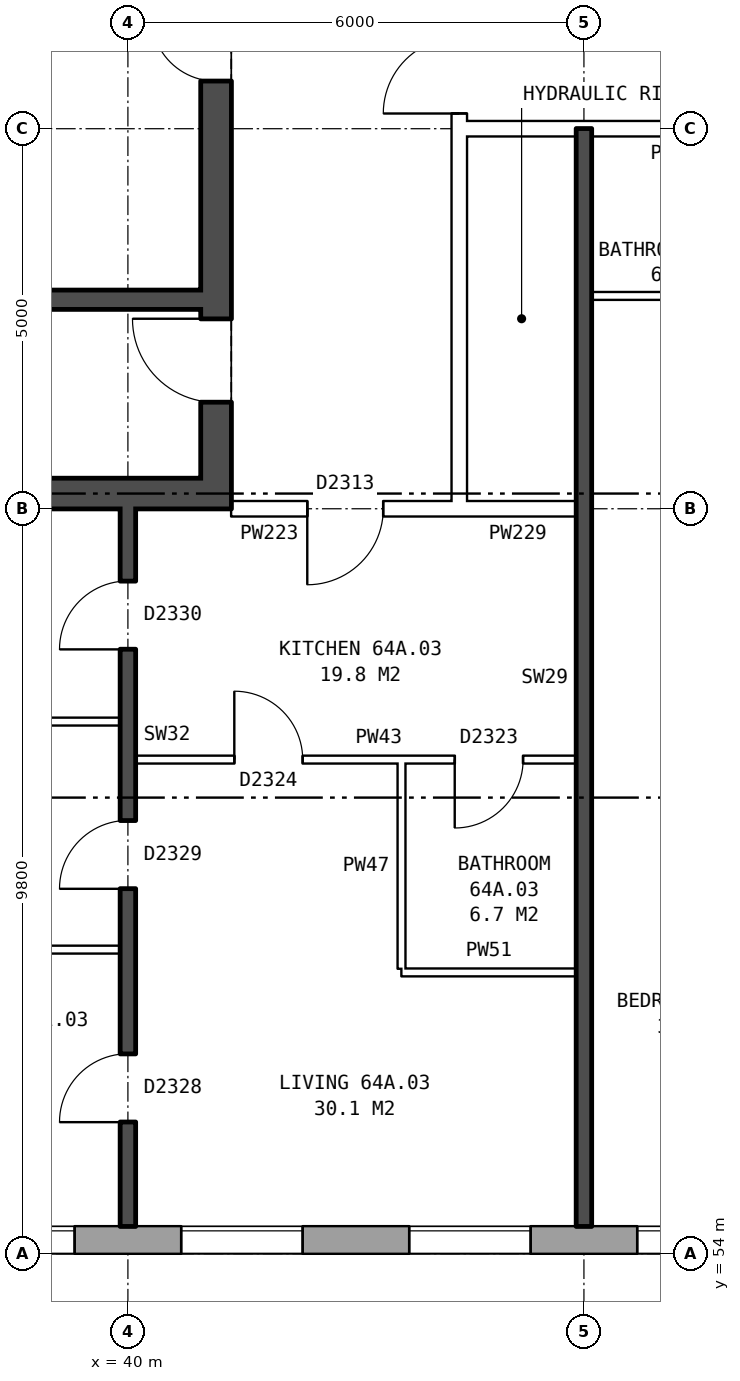
"""IFC4 building model, lengths in metres.
Left out: names, types, materials, properties, quantities, classifications, styles, units other than length and angle.
Written with IfcOpenShell. Run it as: python <this file> out.ifc"""

import sys

from ifc_helpers import new_model, si_unit, direction, frame, frame_2d, origin, place, context, subcontext, project, spatial, rectangle, extrude, element, fill, save


model = new_model("IFC4")
c1 = context("Model", 3, precision=1e-05, world=origin(), true_north=direction((0.0, 1.0)))
c2 = subcontext(c1, "Body", "Model", "MODEL_VIEW")
j1 = project(units=[si_unit("LENGTHUNIT", "METRE"), si_unit("PLANEANGLEUNIT", "RADIAN")], contexts=[c1])
p1 = place(None, origin())
s1 = spatial("IfcSite", under=j1, at=p1, CompositionType="ELEMENT")
p2 = place(p1, origin())
s2 = spatial("IfcBuilding", under=s1, at=p2, CompositionType="ELEMENT")
p3 = place(p2, frame((0.0, 0.0, 227.6)))
s3 = spatial("IfcBuildingStorey", under=s2, at=p3, CompositionType="ELEMENT", Elevation=227.6)
p4 = place(p3, frame((35.075, 54.18, 0.0), z_axis=(0.0, 0.0, 1.0), x_axis=(1.0, 0.0, 0.0)))
e1 = element("IfcWall", 1, at=p4, inside=s3, PredefinedType="STANDARD", context=c2, shape_type="SweptSolid", body=[
    extrude(rectangle(XDim=39.875, YDim=0.36, at=frame_2d((19.938, 0.0))), origin(), (0.0, 0.0, 1.0), 2.85),
])
p5 = place(p4, frame((2.625, 0.0, 0.8)))
e2 = element("IfcOpeningElement", 2, at=p5, cuts=e1, PredefinedType="OPENING", context=c2, shape_type="SweptSolid", body=[
    extrude(rectangle(XDim=1.6, YDim=1.8, at=frame_2d((0.8, 0.9))), frame((0.0, 0.19, 0.0), z_axis=(0.0, -1.0, 0.0), x_axis=(1.0, 0.0, 0.0)), (0.0, 0.0, 1.0), 0.38),
])
p6 = place(p4, frame((5.625, 0.0, 0.8)))
e3 = element("IfcOpeningElement", 3, at=p6, cuts=e1, PredefinedType="OPENING", context=c2, shape_type="SweptSolid", body=[
    extrude(rectangle(XDim=1.6, YDim=1.8, at=frame_2d((0.8, 0.9))), frame((0.0, 0.19, 0.0), z_axis=(0.0, -1.0, 0.0), x_axis=(1.0, 0.0, 0.0)), (0.0, 0.0, 1.0), 0.38),
])
p7 = place(p4, frame((8.625, 0.0, 0.8)))
e4 = element("IfcOpeningElement", 4, at=p7, cuts=e1, PredefinedType="OPENING", context=c2, shape_type="SweptSolid", body=[
    extrude(rectangle(XDim=1.6, YDim=1.8, at=frame_2d((0.8, 0.9))), frame((0.0, 0.19, 0.0), z_axis=(0.0, -1.0, 0.0), x_axis=(1.0, 0.0, 0.0)), (0.0, 0.0, 1.0), 0.38),
])
p8 = place(p4, frame((11.625, 0.0, 0.8)))
e5 = element("IfcOpeningElement", 5, at=p8, cuts=e1, PredefinedType="OPENING", context=c2, shape_type="SweptSolid", body=[
    extrude(rectangle(XDim=1.6, YDim=1.8, at=frame_2d((0.8, 0.9))), frame((0.0, 0.19, 0.0), z_axis=(0.0, -1.0, 0.0), x_axis=(1.0, 0.0, 0.0)), (0.0, 0.0, 1.0), 0.38),
])
p9 = place(p4, frame((14.625, 0.0, 0.35)))
e6 = element("IfcOpeningElement", 6, at=p9, cuts=e1, PredefinedType="OPENING", context=c2, shape_type="SweptSolid", body=[
    extrude(rectangle(XDim=0.6, YDim=0.9, at=frame_2d((0.3, 0.45))), frame((0.0, 0.19, 0.0), z_axis=(0.0, -1.0, 0.0), x_axis=(1.0, 0.0, 0.0)), (0.0, 0.0, 1.0), 0.38),
])
p10 = place(p4, frame((17.625, 0.0, 0.8)))
e7 = element("IfcOpeningElement", 7, at=p10, cuts=e1, PredefinedType="OPENING", context=c2, shape_type="SweptSolid", body=[
    extrude(rectangle(XDim=1.6, YDim=1.8, at=frame_2d((0.8, 0.9))), frame((0.0, 0.19, 0.0), z_axis=(0.0, -1.0, 0.0), x_axis=(1.0, 0.0, 0.0)), (0.0, 0.0, 1.0), 0.38),
])
p11 = place(p4, frame((20.625, 0.0, 0.8)))
e8 = element("IfcOpeningElement", 8, at=p11, cuts=e1, PredefinedType="OPENING", context=c2, shape_type="SweptSolid", body=[
    extrude(rectangle(XDim=1.6, YDim=1.8, at=frame_2d((0.8, 0.9))), frame((0.0, 0.19, 0.0), z_axis=(0.0, -1.0, 0.0), x_axis=(1.0, 0.0, 0.0)), (0.0, 0.0, 1.0), 0.38),
])
p12 = place(p4, frame((24.075, 0.0, 1.7)))
e9 = element("IfcOpeningElement", 9, at=p12, cuts=e1, PredefinedType="OPENING", context=c2, shape_type="SweptSolid", body=[
    extrude(rectangle(XDim=0.6, YDim=0.9, at=frame_2d((0.3, 0.45))), frame((0.0, 0.19, 0.0), z_axis=(0.0, -1.0, 0.0), x_axis=(1.0, 0.0, 0.0)), (0.0, 0.0, 1.0), 0.38),
])
p13 = place(p4, frame((26.625, 0.0, 0.8)))
e10 = element("IfcOpeningElement", 10, at=p13, cuts=e1, PredefinedType="OPENING", context=c2, shape_type="SweptSolid", body=[
    extrude(rectangle(XDim=1.6, YDim=1.8, at=frame_2d((0.8, 0.9))), frame((0.0, 0.19, 0.0), z_axis=(0.0, -1.0, 0.0), x_axis=(1.0, 0.0, 0.0)), (0.0, 0.0, 1.0), 0.38),
])
p14 = place(p4, frame((29.625, 0.0, 0.8)))
e11 = element("IfcOpeningElement", 11, at=p14, cuts=e1, PredefinedType="OPENING", context=c2, shape_type="SweptSolid", body=[
    extrude(rectangle(XDim=1.6, YDim=1.8, at=frame_2d((0.8, 0.9))), frame((0.0, 0.19, 0.0), z_axis=(0.0, -1.0, 0.0), x_axis=(1.0, 0.0, 0.0)), (0.0, 0.0, 1.0), 0.38),
])
p15 = place(p4, frame((32.625, 0.0, 0.8)))
e12 = element("IfcOpeningElement", 12, at=p15, cuts=e1, PredefinedType="OPENING", context=c2, shape_type="SweptSolid", body=[
    extrude(rectangle(XDim=1.6, YDim=1.8, at=frame_2d((0.8, 0.9))), frame((0.0, 0.19, 0.0), z_axis=(0.0, -1.0, 0.0), x_axis=(1.0, 0.0, 0.0)), (0.0, 0.0, 1.0), 0.38),
])
p16 = place(p4, frame((35.625, 0.0, 0.8)))
e13 = element("IfcOpeningElement", 13, at=p16, cuts=e1, PredefinedType="OPENING", context=c2, shape_type="SweptSolid", body=[
    extrude(rectangle(XDim=1.6, YDim=1.8, at=frame_2d((0.8, 0.9))), frame((0.0, 0.19, 0.0), z_axis=(0.0, -1.0, 0.0), x_axis=(1.0, 0.0, 0.0)), (0.0, 0.0, 1.0), 0.38),
])
p17 = place(p4, frame((15.525, 0.0, 0.75)))
e14 = element("IfcOpeningElement", 14, at=p17, cuts=e1, PredefinedType="OPENING", context=c2, shape_type="SweptSolid", body=[
    extrude(rectangle(XDim=1.2, YDim=1.8, at=frame_2d((0.6, 0.9))), frame((0.0, 0.19, 0.0), z_axis=(0.0, -1.0, 0.0), x_axis=(1.0, 0.0, 0.0)), (0.0, 0.0, 1.0), 0.38),
])
p18 = place(p4, frame((24.975, 0.0, 0.8)))
e15 = element("IfcOpeningElement", 15, at=p18, cuts=e1, PredefinedType="OPENING", context=c2, shape_type="SweptSolid", body=[
    extrude(rectangle(XDim=0.8, YDim=1.8, at=frame_2d((0.4, 0.9))), frame((0.0, 0.19, 0.0), z_axis=(0.0, -1.0, 0.0), x_axis=(1.0, 0.0, 0.0)), (0.0, 0.0, 1.0), 0.38),
])
p19 = place(p3, frame((41.16, 76.2, 0.0), z_axis=(0.0, 0.0, 1.0), x_axis=(0.0, -1.0, 0.0)))
e16 = element("IfcWall", 16, at=p19, inside=s3, PredefinedType="SHEAR", context=c2, shape_type="SweptSolid", body=[
    extrude(rectangle(XDim=12.4, YDim=0.4, at=frame_2d((6.2, 0.0))), origin(), (0.0, 0.0, 1.0), 2.85),
])
p20 = place(p19, frame((1.325, 0.0, 0.0)))
e17 = element("IfcOpeningElement", 17, at=p20, cuts=e16, PredefinedType="OPENING", context=c2, shape_type="SweptSolid", body=[
    extrude(rectangle(XDim=1.1, YDim=2.1, at=frame_2d((0.55, 1.05))), frame((0.0, 0.21, 0.0), z_axis=(0.0, -1.0, 0.0), x_axis=(1.0, 0.0, 0.0)), (0.0, 0.0, 1.0), 0.42),
])
p21 = place(p19, frame((5.925, 0.0, 0.0)))
e18 = element("IfcOpeningElement", 18, at=p21, cuts=e16, PredefinedType="OPENING", context=c2, shape_type="SweptSolid", body=[
    extrude(rectangle(XDim=0.85, YDim=2.1, at=frame_2d((0.425, 1.05))), frame((0.0, 0.21, 0.0), z_axis=(0.0, -1.0, 0.0), x_axis=(1.0, 0.0, 0.0)), (0.0, 0.0, 1.0), 0.42),
])
p22 = place(p19, frame((9.9, 0.0, 0.0)))
e19 = element("IfcOpeningElement", 19, at=p22, cuts=e16, PredefinedType="OPENING", context=c2, shape_type="SweptSolid", body=[
    extrude(rectangle(XDim=1.1, YDim=2.1, at=frame_2d((0.55, 1.05))), frame((0.0, 0.21, 0.0), z_axis=(0.0, -1.0, 0.0), x_axis=(1.0, 0.0, 0.0)), (0.0, 0.0, 1.0), 0.42),
])
p23 = place(p3, frame((40.96, 64.0, 0.0), z_axis=(0.0, 0.0, 1.0), x_axis=(-1.0, 0.0, 0.0)))
e20 = element("IfcWall", 20, at=p23, inside=s3, PredefinedType="SHEAR", context=c2, shape_type="SweptSolid", body=[
    extrude(rectangle(XDim=8.2, YDim=0.4, at=frame_2d((4.1, 0.0))), origin(), (0.0, 0.0, 1.0), 2.85),
])
p24 = place(p3, frame((40.96, 66.55, 0.0), z_axis=(0.0, 0.0, 1.0), x_axis=(-1.0, 0.0, 0.0)))
e21 = element("IfcWall", 21, at=p24, inside=s3, PredefinedType="SHEAR", context=c2, shape_type="SweptSolid", body=[
    extrude(rectangle(XDim=2.525, YDim=0.25, at=frame_2d((1.262, 0.0))), origin(), (0.0, 0.0, 1.0), 2.85),
])
p25 = place(p3, frame((44.36, 63.9, 0.0), z_axis=(0.0, 0.0, 1.0), x_axis=(0.0, 1.0, 0.0)))
e22 = element("IfcWall", 22, at=p25, inside=s3, PredefinedType="PARTITIONING", context=c2, shape_type="SweptSolid", body=[
    extrude(rectangle(XDim=12.2, YDim=0.2, at=frame_2d((6.1, 0.0))), origin(), (0.0, 0.0, 1.0), 2.85),
])
p26 = place(p25, frame((5.1, 0.0, 0.0)))
e23 = element("IfcOpeningElement", 23, at=p26, cuts=e22, PredefinedType="OPENING", context=c2, shape_type="SweptSolid", body=[
    extrude(rectangle(XDim=2.0, YDim=2.1, at=frame_2d((1.0, 1.05))), frame((0.0, 0.11, 0.0), z_axis=(0.0, -1.0, 0.0), x_axis=(1.0, 0.0, 0.0)), (0.0, 0.0, 1.0), 0.22),
])
p27 = place(p3, frame((43.6, 57.7, 0.0), z_axis=(0.0, 0.0, 1.0), x_axis=(1.0, 0.0, 0.0)))
e24 = element("IfcWall", 24, at=p27, inside=s3, PredefinedType="PARTITIONING", context=c2, shape_type="SweptSolid", body=[
    extrude(rectangle(XDim=2.3, YDim=0.1, at=frame_2d((1.15, 0.0))), origin(), (0.0, 0.0, 1.0), 2.85),
])
p28 = place(p3, frame((32.36, 58.0, 0.0), z_axis=(0.0, 0.0, 1.0), x_axis=(1.0, 0.0, 0.0)))
e25 = element("IfcWall", 25, at=p28, inside=s3, PredefinedType="PARTITIONING", context=c2, shape_type="SweptSolid", body=[
    extrude(rectangle(XDim=7.54, YDim=0.1, at=frame_2d((3.77, 0.0))), origin(), (0.0, 0.0, 1.0), 2.85),
])
p29 = place(p3, frame((40.1, 60.5, 0.0), z_axis=(0.0, 0.0, 1.0), x_axis=(1.0, 0.0, 0.0)))
e26 = element("IfcWall", 26, at=p29, inside=s3, PredefinedType="PARTITIONING", context=c2, shape_type="SweptSolid", body=[
    extrude(rectangle(XDim=5.8, YDim=0.1, at=frame_2d((2.9, 0.0))), origin(), (0.0, 0.0, 1.0), 2.85),
])
p30 = place(p29, frame((1.3, 0.0, 0.0)))
e27 = element("IfcOpeningElement", 27, at=p30, cuts=e26, PredefinedType="OPENING", context=c2, shape_type="SweptSolid", body=[
    extrude(rectangle(XDim=0.9, YDim=2.1, at=frame_2d((0.45, 1.05))), frame((0.0, 0.06, 0.0), z_axis=(0.0, -1.0, 0.0), x_axis=(1.0, 0.0, 0.0)), (0.0, 0.0, 1.0), 0.12),
])
p31 = place(p29, frame((4.2, 0.0, 0.0)))
e28 = element("IfcOpeningElement", 28, at=p31, cuts=e26, PredefinedType="OPENING", context=c2, shape_type="SweptSolid", body=[
    extrude(rectangle(XDim=0.9, YDim=2.1, at=frame_2d((0.45, 1.05))), frame((0.0, 0.06, 0.0), z_axis=(0.0, -1.0, 0.0), x_axis=(1.0, 0.0, 0.0)), (0.0, 0.0, 1.0), 0.12),
])
p32 = place(p3, frame((32.36, 61.0, 0.0), z_axis=(0.0, 0.0, 1.0), x_axis=(1.0, 0.0, 0.0)))
e29 = element("IfcWall", 29, at=p32, inside=s3, PredefinedType="PARTITIONING", context=c2, shape_type="SweptSolid", body=[
    extrude(rectangle(XDim=7.54, YDim=0.1, at=frame_2d((3.77, 0.0))), origin(), (0.0, 0.0, 1.0), 2.85),
])
p33 = place(p3, frame((41.36, 63.8, 0.0), z_axis=(0.0, 0.0, 1.0), x_axis=(1.0, 0.0, 0.0)))
e30 = element("IfcWall", 30, at=p33, inside=s3, PredefinedType="PARTITIONING", context=c2, shape_type="SweptSolid", body=[
    extrude(rectangle(XDim=3.0, YDim=0.2, at=frame_2d((1.5, 0.0))), origin(), (0.0, 0.0, 1.0), 2.85),
])
p34 = place(p33, frame((1.0, 0.0, 0.0)))
e31 = element("IfcOpeningElement", 31, at=p34, cuts=e30, PredefinedType="OPENING", context=c2, shape_type="SweptSolid", body=[
    extrude(rectangle(XDim=1.0, YDim=2.1, at=frame_2d((0.5, 1.05))), frame((0.0, 0.11, 0.0), z_axis=(0.0, -1.0, 0.0), x_axis=(1.0, 0.0, 0.0)), (0.0, 0.0, 1.0), 0.22),
])
p35 = place(p3, frame((44.36, 63.8, 0.0), z_axis=(0.0, 0.0, 1.0), x_axis=(1.0, 0.0, 0.0)))
e32 = element("IfcWall", 32, at=p35, inside=s3, PredefinedType="PARTITIONING", context=c2, shape_type="SweptSolid", body=[
    extrude(rectangle(XDim=1.54, YDim=0.2, at=frame_2d((0.77, 0.0))), origin(), (0.0, 0.0, 1.0), 2.85),
])
p36 = place(p3, frame((46.1, 66.6, 0.0), z_axis=(0.0, 0.0, 1.0), x_axis=(1.0, 0.0, 0.0)))
e33 = element("IfcWall", 33, at=p36, inside=s3, PredefinedType="PARTITIONING", context=c2, shape_type="SweptSolid", body=[
    extrude(rectangle(XDim=2.9, YDim=0.1, at=frame_2d((1.45, 0.0))), origin(), (0.0, 0.0, 1.0), 2.85),
])
p37 = place(p3, frame((44.36, 68.8, 0.0), z_axis=(0.0, 0.0, 1.0), x_axis=(1.0, 0.0, 0.0)))
e34 = element("IfcWall", 34, at=p37, inside=s3, PredefinedType="PARTITIONING", context=c2, shape_type="SweptSolid", body=[
    extrude(rectangle(XDim=19.28, YDim=0.2, at=frame_2d((9.64, 0.0))), origin(), (0.0, 0.0, 1.0), 2.85),
])
p38 = place(p37, frame((14.64, 0.0, 0.0)))
e35 = element("IfcOpeningElement", 35, at=p38, cuts=e34, PredefinedType="OPENING", context=c2, shape_type="SweptSolid", body=[
    extrude(rectangle(XDim=1.0, YDim=2.1, at=frame_2d((0.5, 1.05))), frame((0.0, 0.11, 0.0), z_axis=(0.0, -1.0, 0.0), x_axis=(1.0, 0.0, 0.0)), (0.0, 0.0, 1.0), 0.22),
])
p39 = place(p37, frame((8.64, 0.0, 0.0)))
e36 = element("IfcOpeningElement", 36, at=p39, cuts=e34, PredefinedType="OPENING", context=c2, shape_type="SweptSolid", body=[
    extrude(rectangle(XDim=1.0, YDim=2.1, at=frame_2d((0.5, 1.05))), frame((0.0, 0.11, 0.0), z_axis=(0.0, -1.0, 0.0), x_axis=(1.0, 0.0, 0.0)), (0.0, 0.0, 1.0), 0.22),
])
p40 = place(p37, frame((5.64, 0.0, 0.0)))
e37 = element("IfcOpeningElement", 37, at=p40, cuts=e34, PredefinedType="OPENING", context=c2, shape_type="SweptSolid", body=[
    extrude(rectangle(XDim=1.0, YDim=2.1, at=frame_2d((0.5, 1.05))), frame((0.0, 0.11, 0.0), z_axis=(0.0, -1.0, 0.0), x_axis=(1.0, 0.0, 0.0)), (0.0, 0.0, 1.0), 0.22),
])
p41 = place(p3, frame((40.0, 54.36, 0.0), z_axis=(0.0, 0.0, 1.0), x_axis=(0.0, 1.0, 0.0)))
e38 = element("IfcWall", 38, at=p41, inside=s3, PredefinedType="SOLIDWALL", context=c2, shape_type="SweptSolid", body=[
    extrude(rectangle(XDim=9.44, YDim=0.2, at=frame_2d((4.72, 0.0))), origin(), (0.0, 0.0, 1.0), 2.85),
])
p42 = place(p41, frame((1.37, 0.0, 0.0)))
e39 = element("IfcOpeningElement", 39, at=p42, cuts=e38, PredefinedType="OPENING", context=c2, shape_type="SweptSolid", body=[
    extrude(rectangle(XDim=0.9, YDim=2.1, at=frame_2d((0.45, 1.05))), frame((0.0, 0.11, 0.0), z_axis=(0.0, -1.0, 0.0), x_axis=(1.0, 0.0, 0.0)), (0.0, 0.0, 1.0), 0.22),
])
p43 = place(p41, frame((4.44, 0.0, 0.0)))
e40 = element("IfcOpeningElement", 40, at=p43, cuts=e38, PredefinedType="OPENING", context=c2, shape_type="SweptSolid", body=[
    extrude(rectangle(XDim=0.9, YDim=2.1, at=frame_2d((0.45, 1.05))), frame((0.0, 0.11, 0.0), z_axis=(0.0, -1.0, 0.0), x_axis=(1.0, 0.0, 0.0)), (0.0, 0.0, 1.0), 0.22),
])
p44 = place(p41, frame((7.59, 0.0, 0.0)))
e41 = element("IfcOpeningElement", 41, at=p44, cuts=e38, PredefinedType="OPENING", context=c2, shape_type="SweptSolid", body=[
    extrude(rectangle(XDim=0.9, YDim=2.1, at=frame_2d((0.45, 1.05))), frame((0.0, 0.11, 0.0), z_axis=(0.0, -1.0, 0.0), x_axis=(1.0, 0.0, 0.0)), (0.0, 0.0, 1.0), 0.22),
])
p45 = place(p3, frame((43.6, 57.75, 0.0), z_axis=(0.0, 0.0, 1.0), x_axis=(0.0, 1.0, 0.0)))
e42 = element("IfcWall", 42, at=p45, inside=s3, PredefinedType="PARTITIONING", context=c2, shape_type="SweptSolid", body=[
    extrude(rectangle(XDim=2.7, YDim=0.1, at=frame_2d((1.35, 0.0))), origin(), (0.0, 0.0, 1.0), 2.85),
])
p46 = place(p3, frame((46.0, 54.36, 0.0), z_axis=(0.0, 0.0, 1.0), x_axis=(0.0, 1.0, 0.0)))
e43 = element("IfcWall", 43, at=p46, inside=s3, PredefinedType="SOLIDWALL", context=c2, shape_type="SweptSolid", body=[
    extrude(rectangle(XDim=14.44, YDim=0.2, at=frame_2d((7.22, 0.0))), origin(), (0.0, 0.0, 1.0), 2.85),
])
p47 = place(p5, origin())
e44 = element("IfcWindow", 44, at=p47, inside=s3, PartitioningType="SINGLE_PANEL", PredefinedType="WINDOW", context=c2, shape_type="SweptSolid", body=[
    extrude(rectangle(XDim=1.6, YDim=1.8, at=frame_2d((0.8, 0.9))), frame((0.0, 0.15, 0.0), z_axis=(0.0, -1.0, 0.0), x_axis=(1.0, 0.0, 0.0)), (0.0, 0.0, 1.0), 0.06),
])
fill(e2, e44)
p48 = place(p6, origin())
e45 = element("IfcWindow", 45, at=p48, inside=s3, PartitioningType="SINGLE_PANEL", PredefinedType="WINDOW", context=c2, shape_type="SweptSolid", body=[
    extrude(rectangle(XDim=1.6, YDim=1.8, at=frame_2d((0.8, 0.9))), frame((0.0, 0.15, 0.0), z_axis=(0.0, -1.0, 0.0), x_axis=(1.0, 0.0, 0.0)), (0.0, 0.0, 1.0), 0.06),
])
fill(e3, e45)
p49 = place(p7, origin())
e46 = element("IfcWindow", 46, at=p49, inside=s3, PartitioningType="SINGLE_PANEL", PredefinedType="WINDOW", context=c2, shape_type="SweptSolid", body=[
    extrude(rectangle(XDim=1.6, YDim=1.8, at=frame_2d((0.8, 0.9))), frame((0.0, 0.15, 0.0), z_axis=(0.0, -1.0, 0.0), x_axis=(1.0, 0.0, 0.0)), (0.0, 0.0, 1.0), 0.06),
])
fill(e4, e46)
p50 = place(p8, origin())
e47 = element("IfcWindow", 47, at=p50, inside=s3, PartitioningType="SINGLE_PANEL", PredefinedType="WINDOW", context=c2, shape_type="SweptSolid", body=[
    extrude(rectangle(XDim=1.6, YDim=1.8, at=frame_2d((0.8, 0.9))), frame((0.0, 0.15, 0.0), z_axis=(0.0, -1.0, 0.0), x_axis=(1.0, 0.0, 0.0)), (0.0, 0.0, 1.0), 0.06),
])
fill(e5, e47)
p51 = place(p21, frame((0.85, 0.0, 0.0), z_axis=(0.0, 0.0, 1.0), x_axis=(-1.0, 0.0, 0.0)))
e48 = element("IfcDoor", 48, at=p51, inside=s3, OperationType="SINGLE_SWING_RIGHT", PredefinedType="DOOR", context=c2, shape_type="SweptSolid", body=[
    extrude(rectangle(XDim=0.85, YDim=2.1, at=frame_2d((0.425, 1.05))), frame((0.0, 0.185, 0.0), z_axis=(0.0, -1.0, 0.0), x_axis=(1.0, 0.0, 0.0)), (0.0, 0.0, 1.0), 0.05),
])
fill(e18, e48)
p52 = place(p22, frame((1.1, 0.0, 0.0), z_axis=(0.0, 0.0, 1.0), x_axis=(-1.0, 0.0, 0.0)))
e49 = element("IfcDoor", 49, at=p52, inside=s3, OperationType="SINGLE_SWING_RIGHT", PredefinedType="DOOR", context=c2, shape_type="SweptSolid", body=[
    extrude(rectangle(XDim=1.1, YDim=2.1, at=frame_2d((0.55, 1.05))), frame((0.0, 0.185, 0.0), z_axis=(0.0, -1.0, 0.0), x_axis=(1.0, 0.0, 0.0)), (0.0, 0.0, 1.0), 0.05),
])
fill(e19, e49)
p53 = place(p26, origin())
e50 = element("IfcDoor", 50, at=p53, inside=s3, OperationType="DOUBLE_DOOR_SINGLE_SWING", PredefinedType="DOOR", context=c2, shape_type="SweptSolid", body=[
    extrude(rectangle(XDim=2.0, YDim=2.1, at=frame_2d((1.0, 1.05))), frame((0.0, 0.025, 0.0), z_axis=(0.0, -1.0, 0.0), x_axis=(1.0, 0.0, 0.0)), (0.0, 0.0, 1.0), 0.05),
])
fill(e23, e50)
p54 = place(p42, origin())
e51 = element("IfcDoor", 51, at=p54, inside=s3, OperationType="SINGLE_SWING_LEFT", PredefinedType="DOOR", context=c2, shape_type="SweptSolid", body=[
    extrude(rectangle(XDim=0.9, YDim=2.1, at=frame_2d((0.45, 1.05))), frame((0.0, 0.025, 0.0), z_axis=(0.0, -1.0, 0.0), x_axis=(1.0, 0.0, 0.0)), (0.0, 0.0, 1.0), 0.05),
])
fill(e39, e51)
p55 = place(p43, origin())
e52 = element("IfcDoor", 52, at=p55, inside=s3, OperationType="SINGLE_SWING_LEFT", PredefinedType="DOOR", context=c2, shape_type="SweptSolid", body=[
    extrude(rectangle(XDim=0.9, YDim=2.1, at=frame_2d((0.45, 1.05))), frame((0.0, 0.025, 0.0), z_axis=(0.0, -1.0, 0.0), x_axis=(1.0, 0.0, 0.0)), (0.0, 0.0, 1.0), 0.05),
])
fill(e40, e52)
p56 = place(p44, origin())
e53 = element("IfcDoor", 53, at=p56, inside=s3, OperationType="SINGLE_SWING_LEFT", PredefinedType="DOOR", context=c2, shape_type="SweptSolid", body=[
    extrude(rectangle(XDim=0.9, YDim=2.1, at=frame_2d((0.45, 1.05))), frame((0.0, 0.025, 0.0), z_axis=(0.0, -1.0, 0.0), x_axis=(1.0, 0.0, 0.0)), (0.0, 0.0, 1.0), 0.05),
])
fill(e41, e53)
p57 = place(p34, frame((1.0, 0.0, 0.0), z_axis=(0.0, 0.0, 1.0), x_axis=(-1.0, 0.0, 0.0)))
e54 = element("IfcDoor", 54, at=p57, inside=s3, OperationType="SINGLE_SWING_RIGHT", PredefinedType="DOOR", context=c2, shape_type="SweptSolid", body=[
    extrude(rectangle(XDim=1.0, YDim=2.1, at=frame_2d((0.5, 1.05))), frame((0.0, 0.025, 0.0), z_axis=(0.0, -1.0, 0.0), x_axis=(1.0, 0.0, 0.0)), (0.0, 0.0, 1.0), 0.05),
])
fill(e31, e54)
p58 = place(p30, origin())
e55 = element("IfcDoor", 55, at=p58, inside=s3, OperationType="SINGLE_SWING_LEFT", PredefinedType="DOOR", context=c2, shape_type="SweptSolid", body=[
    extrude(rectangle(XDim=0.9, YDim=2.1, at=frame_2d((0.45, 1.05))), frame((0.0, 0.025, 0.0), z_axis=(0.0, -1.0, 0.0), x_axis=(1.0, 0.0, 0.0)), (0.0, 0.0, 1.0), 0.05),
])
fill(e27, e55)
p59 = place(p31, frame((0.9, 0.0, 0.0), z_axis=(0.0, 0.0, 1.0), x_axis=(-1.0, 0.0, 0.0)))
e56 = element("IfcDoor", 56, at=p59, inside=s3, OperationType="SINGLE_SWING_RIGHT", PredefinedType="DOOR", context=c2, shape_type="SweptSolid", body=[
    extrude(rectangle(XDim=0.9, YDim=2.1, at=frame_2d((0.45, 1.05))), frame((0.0, 0.025, 0.0), z_axis=(0.0, -1.0, 0.0), x_axis=(1.0, 0.0, 0.0)), (0.0, 0.0, 1.0), 0.05),
])
fill(e28, e56)
save(model, sys.argv[1])
